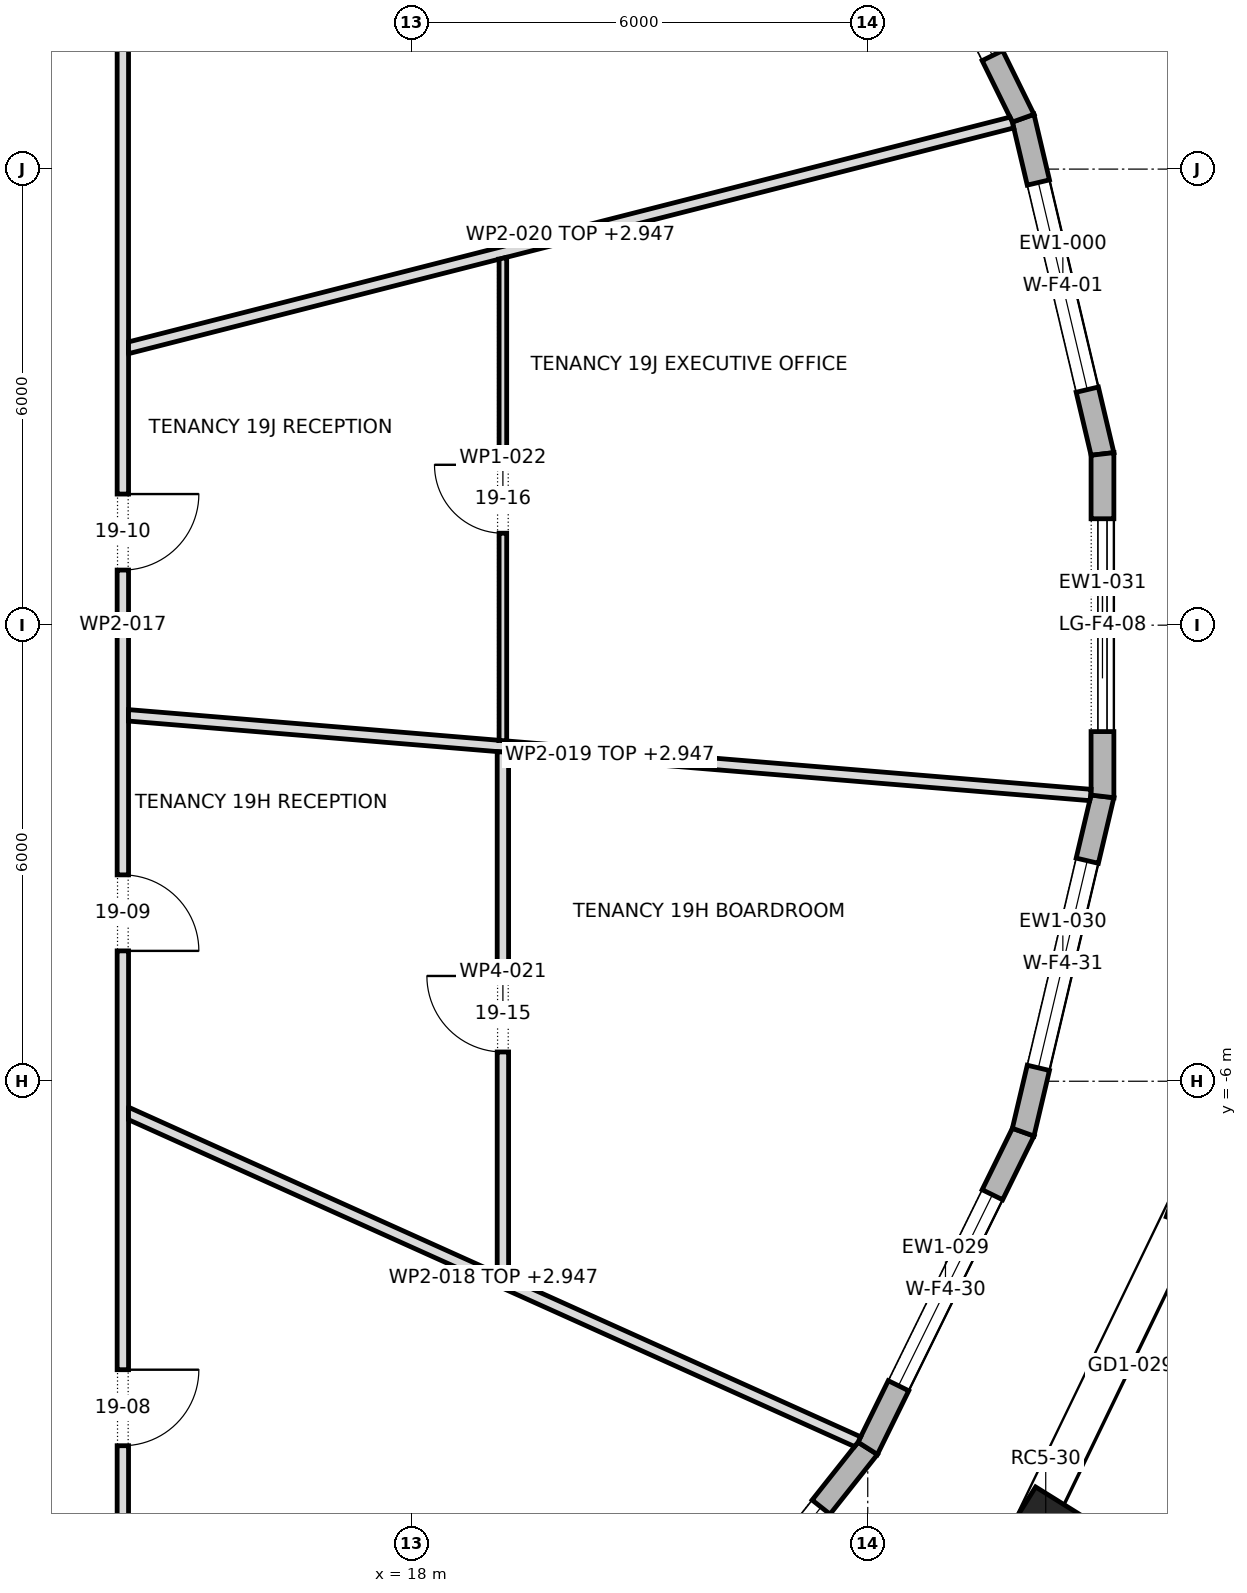
"""IFC4 building model, lengths in metres.
Left out: names, types, materials, properties, quantities, classifications, styles, units other than length and angle.
Written with IfcOpenShell. Run it as: python <this file> out.ifc"""

import sys

from ifc_helpers import new_model, si_unit, direction, frame, frame_2d, origin, origin_2d, place, context, subcontext, project, spatial, polyline, rectangle, outline, extrude, element, fill, save


model = new_model("IFC4")
c1 = context("Model", 3, precision=1e-05, world=origin(), true_north=direction((0.0, 1.0)))
c2 = subcontext(c1, "Body", "Model", "MODEL_VIEW")
j1 = project(units=[si_unit("LENGTHUNIT", "METRE"), si_unit("PLANEANGLEUNIT", "RADIAN")], contexts=[c1])
p1 = place(None, origin())
s1 = spatial("IfcSite", under=j1, at=p1, CompositionType="ELEMENT")
p2 = place(p1, origin())
s2 = spatial("IfcBuilding", under=s1, at=p2, CompositionType="ELEMENT")
p3 = place(p2, frame((0.0, 0.0, 268.3)))
s3 = spatial("IfcBuildingStorey", under=s2, at=p3, CompositionType="ELEMENT", Elevation=268.3)
for number, where, z_axis, x_axis in (
    (1, (28.582, 7.432, 0.0), (0.0, 0.0, 1.0), (-0.334, 0.943, 0.0)),
    (2, (26.342, -12.069, 0.0), (0.0, 0.0, 1.0), (0.529, 0.849, 0.0)),
    (3, (28.582, -7.432, 0.0), (0.0, 0.0, 1.0), (0.334, 0.943, 0.0)),
):
    element("IfcColumn", number, at=place(p3, frame(where, z_axis=z_axis, x_axis=x_axis)), inside=s3, PredefinedType="COLUMN", context=c2, shape_type="SweptSolid", body=[
        extrude(rectangle(XDim=1.1, YDim=1.0, at=origin_2d()), origin(), (0.0, 0.0, 1.0), 4.0),
    ])
p4 = place(p3, frame((27.088, 2.252, 0.0), z_axis=(0.0, 0.0, 1.0), x_axis=(-0.22983372436, 0.973229910734, 0.0)))
e4 = element("IfcWall", 4, at=p4, inside=s3, PredefinedType="STANDARD", context=c2, shape_type="SweptSolid", body=[
    extrude(outline(polyline([(-0.018, -0.15), (4.556, -0.15), (4.522, 0.15), (0.018, 0.15), (-0.018, -0.15)])), origin(), (0.0, 0.0, 1.0), 3.7),
])
p5 = place(p4, frame((0.869, 0.0, 0.6)))
e5 = element("IfcOpeningElement", 5, at=p5, cuts=e4, PredefinedType="OPENING", context=c2, shape_type="SweptSolid", body=[
    extrude(rectangle(XDim=2.8, YDim=2.65, at=frame_2d((1.4, 1.325))), frame((0.0, 0.162, 0.0), z_axis=(0.0, -1.0, 0.0), x_axis=(1.0, 0.0, 0.0)), (0.0, 0.0, 1.0), 0.324),
])
p6 = place(p3, frame((26.045, 6.67, 0.0), z_axis=(0.0, 0.0, 1.0), x_axis=(-0.441261940724, 0.897378348117, 0.0)))
e6 = element("IfcWall", 6, at=p6, inside=s3, PredefinedType="STANDARD", context=c2, shape_type="SweptSolid", body=[
    extrude(outline(polyline([(-0.017, -0.15), (4.651, -0.15), (4.619, 0.15), (0.017, 0.15), (-0.017, -0.15)])), origin(), (0.0, 0.0, 1.0), 3.7),
])
p7 = place(p6, frame((0.917, 0.0, 0.6)))
e7 = element("IfcOpeningElement", 7, at=p7, cuts=e6, PredefinedType="OPENING", context=c2, shape_type="SweptSolid", body=[
    extrude(rectangle(XDim=2.8, YDim=2.65, at=frame_2d((1.4, 1.325))), frame((0.0, 0.162, 0.0), z_axis=(0.0, -1.0, 0.0), x_axis=(1.0, 0.0, 0.0)), (0.0, 0.0, 1.0), 0.324),
])
p8 = place(p3, frame((21.032, -14.57, 0.0), z_axis=(0.0, 0.0, 1.0), x_axis=(0.621434755851, 0.783465917715, 0.0)))
e8 = element("IfcWall", 8, at=p8, inside=s3, PredefinedType="STANDARD", context=c2, shape_type="SweptSolid", body=[
    extrude(outline(polyline([(-0.015, -0.15), (4.791, -0.15), (4.759, 0.15), (0.015, 0.15), (-0.015, -0.15)])), origin(), (0.0, 0.0, 1.0), 3.7),
])
p9 = place(p8, frame((0.987, 0.0, 0.6)))
e9 = element("IfcOpeningElement", 9, at=p9, cuts=e8, PredefinedType="OPENING", context=c2, shape_type="SweptSolid", body=[
    extrude(rectangle(XDim=2.8, YDim=2.65, at=frame_2d((1.4, 1.325))), frame((0.0, 0.162, 0.0), z_axis=(0.0, -1.0, 0.0), x_axis=(1.0, 0.0, 0.0)), (0.0, 0.0, 1.0), 0.324),
])
p10 = place(p3, frame((24.0, -10.829, 0.0), z_axis=(0.0, 0.0, 1.0), x_axis=(0.441261940724, 0.897378348117, 0.0)))
e10 = element("IfcWall", 10, at=p10, inside=s3, PredefinedType="STANDARD", context=c2, shape_type="SweptSolid", body=[
    extrude(outline(polyline([(-0.016, -0.15), (4.652, -0.15), (4.618, 0.15), (0.016, 0.15), (-0.016, -0.15)])), origin(), (0.0, 0.0, 1.0), 3.7),
])
p11 = place(p10, frame((0.917, 0.0, 0.6)))
e11 = element("IfcOpeningElement", 11, at=p11, cuts=e10, PredefinedType="OPENING", context=c2, shape_type="SweptSolid", body=[
    extrude(rectangle(XDim=2.8, YDim=2.65, at=frame_2d((1.4, 1.325))), frame((0.0, 0.162, 0.0), z_axis=(0.0, -1.0, 0.0), x_axis=(1.0, 0.0, 0.0)), (0.0, 0.0, 1.0), 0.324),
])
p12 = place(p3, frame((26.045, -6.67, 0.0), z_axis=(0.0, 0.0, 1.0), x_axis=(0.22983372436, 0.973229910734, 0.0)))
e12 = element("IfcWall", 12, at=p12, inside=s3, PredefinedType="STANDARD", context=c2, shape_type="SweptSolid", body=[
    extrude(outline(polyline([(-0.017, -0.15), (4.557, -0.15), (4.521, 0.15), (0.017, 0.15), (-0.017, -0.15)])), origin(), (0.0, 0.0, 1.0), 3.7),
])
p13 = place(p12, frame((0.869, 0.0, 0.6)))
e13 = element("IfcOpeningElement", 13, at=p13, cuts=e12, PredefinedType="OPENING", context=c2, shape_type="SweptSolid", body=[
    extrude(rectangle(XDim=2.8, YDim=2.65, at=frame_2d((1.4, 1.325))), frame((0.0, 0.162, 0.0), z_axis=(0.0, -1.0, 0.0), x_axis=(1.0, 0.0, 0.0)), (0.0, 0.0, 1.0), 0.324),
])
p14 = place(p3, frame((27.088, -2.252, 0.0), z_axis=(0.0, 0.0, 1.0), x_axis=(0.0, 1.0, 0.0)))
e14 = element("IfcWall", 14, at=p14, inside=s3, PredefinedType="STANDARD", context=c2, shape_type="SweptSolid", body=[
    extrude(outline(polyline([(-0.018, -0.15), (4.522, -0.15), (4.487, 0.15), (0.018, 0.15), (-0.018, -0.15)])), origin(), (0.0, 0.0, 1.0), 3.7),
])
p15 = place(p14, frame((0.852, 0.0, 0.0)))
e15 = element("IfcOpeningElement", 15, at=p15, cuts=e14, PredefinedType="OPENING", context=c2, shape_type="SweptSolid", body=[
    extrude(rectangle(XDim=2.8, YDim=3.25, at=frame_2d((1.4, 1.625))), frame((0.0, 0.162, 0.0), z_axis=(0.0, -1.0, 0.0), x_axis=(1.0, 0.0, 0.0)), (0.0, 0.0, 1.0), 0.324),
])
p16 = place(p3, frame((14.2, -14.275, 0.0), z_axis=(0.0, 0.0, 1.0), x_axis=(0.0, 1.0, 0.0)))
e16 = element("IfcWall", 16, at=p16, inside=s3, PredefinedType="PARTITIONING", context=c2, shape_type="SweptSolid", body=[
    extrude(outline(polyline([(28.55, -0.075), (28.55, -0.075), (28.4, 0.075), (26.517, 0.075), (24.633, 0.075), (22.75, 0.075), (20.866, 0.075), (18.983, 0.075), (17.1, 0.075), (15.217, 0.075), (13.333, 0.075), (11.45, 0.075), (9.567, 0.075), (7.683, 0.075), (5.8, 0.075), (3.917, 0.075), (2.033, 0.075), (0.15, 0.075), (0.0, -0.075), (1.903, -0.075), (3.807, -0.075), (5.71, -0.075), (7.613, -0.075), (9.517, -0.075), (11.42, -0.075), (13.323, -0.075), (15.227, -0.075), (17.13, -0.075), (19.033, -0.075), (20.937, -0.075), (22.84, -0.075), (24.743, -0.075), (26.646, -0.075), (28.55, -0.075)])), origin(), (0.0, 0.0, 1.0), 3.7),
])
p17 = place(p16, frame((3.48, 0.0, 0.0)))
e17 = element("IfcOpeningElement", 17, at=p17, cuts=e16, PredefinedType="OPENING", context=c2, shape_type="SweptSolid", body=[
    extrude(rectangle(XDim=1.0, YDim=2.1, at=frame_2d((0.5, 1.05))), frame((0.0, 0.087, 0.0), z_axis=(0.0, -1.0, 0.0), x_axis=(1.0, 0.0, 0.0)), (0.0, 0.0, 1.0), 0.174),
])
p18 = place(p16, frame((9.99, 0.0, 0.0)))
e18 = element("IfcOpeningElement", 18, at=p18, cuts=e16, PredefinedType="OPENING", context=c2, shape_type="SweptSolid", body=[
    extrude(rectangle(XDim=1.0, YDim=2.1, at=frame_2d((0.5, 1.05))), frame((0.0, 0.087, 0.0), z_axis=(0.0, -1.0, 0.0), x_axis=(1.0, 0.0, 0.0)), (0.0, 0.0, 1.0), 0.174),
])
p19 = place(p16, frame((15.0, 0.0, 0.0)))
e19 = element("IfcOpeningElement", 19, at=p19, cuts=e16, PredefinedType="OPENING", context=c2, shape_type="SweptSolid", body=[
    extrude(rectangle(XDim=1.0, YDim=2.1, at=frame_2d((0.5, 1.05))), frame((0.0, 0.087, 0.0), z_axis=(0.0, -1.0, 0.0), x_axis=(1.0, 0.0, 0.0)), (0.0, 0.0, 1.0), 0.174),
])
p20 = place(p16, frame((22.69, 0.0, 0.0)))
e20 = element("IfcOpeningElement", 20, at=p20, cuts=e16, PredefinedType="OPENING", context=c2, shape_type="SweptSolid", body=[
    extrude(rectangle(XDim=1.0, YDim=2.1, at=frame_2d((0.5, 1.05))), frame((0.0, 0.087, 0.0), z_axis=(0.0, -1.0, 0.0), x_axis=(1.0, 0.0, 0.0)), (0.0, 0.0, 1.0), 0.174),
])
p21 = place(p3, frame((14.245, -6.41, 0.0), z_axis=(0.0, 0.0, 1.0), x_axis=(0.91183931518, -0.410547272908, 0.0)))
e21 = element("IfcWall", 21, at=p21, inside=s3, PredefinedType="PARTITIONING", context=c2, shape_type="SweptSolid", body=[
    extrude(outline(polyline([(0.067, -0.075), (1.813, -0.075), (3.559, -0.075), (5.304, -0.075), (7.05, -0.075), (8.796, -0.075), (10.542, -0.075), (10.56, -0.003), (10.562, 0.073), (10.562, 0.075), (8.816, 0.075), (7.07, 0.075), (5.324, 0.075), (5.319, 0.073), (5.318, 0.075), (3.546, 0.075), (1.773, 0.075), (0.0, 0.075), (0.0, 0.074), (0.067, -0.075)])), origin(), (0.0, 0.0, 1.0), 2.947),
])
p22 = place(p3, frame((14.269, -1.186, 0.0), z_axis=(0.0, 0.0, 1.0), x_axis=(0.996588692452, -0.082528650035, 0.0)))
e22 = element("IfcWall", 22, at=p22, inside=s3, PredefinedType="PARTITIONING", context=c2, shape_type="SweptSolid", body=[
    extrude(outline(polyline([(0.012, -0.075), (1.682, -0.075), (3.353, -0.075), (5.023, -0.075), (5.029, -0.074), (5.029, -0.075), (6.947, -0.075), (8.865, -0.075), (10.783, -0.075), (12.701, -0.075), (12.706, -0.042), (12.706, 0.075), (10.753, 0.075), (8.8, 0.075), (6.847, 0.075), (4.894, 0.075), (4.891, 0.075), (4.891, 0.075), (3.261, 0.075), (1.63, 0.075), (0.0, 0.075), (0.0, 0.069), (0.012, -0.075)])), origin(), (0.0, 0.0, 1.0), 2.947),
])
p23 = place(p3, frame((14.257, 3.645, 0.0), z_axis=(0.0, 0.0, 1.0), x_axis=(0.968990601513, 0.247097580277, 0.0)))
e23 = element("IfcWall", 23, at=p23, inside=s3, PredefinedType="PARTITIONING", context=c2, shape_type="SweptSolid", body=[
    extrude(outline(polyline([(12.019, -0.075), (12.019, 0.011), (12.005, 0.075), (10.011, 0.075), (8.016, 0.075), (6.022, 0.075), (4.027, 0.075), (2.033, 0.075), (0.038, 0.075), (0.0, -0.074), (0.0, -0.075), (1.717, -0.075), (3.434, -0.075), (5.151, -0.075), (6.868, -0.075), (8.585, -0.075), (10.302, -0.075), (12.019, -0.075)])), origin(), (0.0, 0.0, 1.0), 2.947),
])
p24 = place(p3, frame((19.2, -1.664, 0.0), z_axis=(0.0, 0.0, 1.0), x_axis=(0.0, -1.0, 0.0)))
e24 = element("IfcWall", 24, at=p24, inside=s3, PredefinedType="PARTITIONING", context=c2, shape_type="SweptSolid", body=[
    extrude(outline(polyline([(0.0, -0.075), (1.715, -0.075), (3.431, -0.075), (5.146, -0.075), (6.862, -0.075), (6.929, 0.074), (6.929, 0.075), (5.2, 0.075), (3.47, 0.075), (1.741, 0.075), (0.012, 0.075), (0.0, -0.07), (0.0, -0.075)])), origin(), (0.0, 0.0, 1.0), 3.7),
])
p25 = place(p24, frame((2.951, 0.0, 0.0)))
e25 = element("IfcOpeningElement", 25, at=p25, cuts=e24, PredefinedType="OPENING", context=c2, shape_type="SweptSolid", body=[
    extrude(rectangle(XDim=1.0, YDim=2.1, at=frame_2d((0.5, 1.05))), frame((0.0, 0.087, 0.0), z_axis=(0.0, -1.0, 0.0), x_axis=(1.0, 0.0, 0.0)), (0.0, 0.0, 1.0), 0.174),
])
p26 = place(p3, frame((19.2, 4.84, 0.0), z_axis=(0.0, 0.0, 1.0), x_axis=(0.0, -1.0, 0.0)))
e26 = element("IfcWall", 26, at=p26, inside=s3, PredefinedType="PARTITIONING", context=c2, shape_type="SweptSolid", body=[
    extrude(outline(polyline([(0.025, -0.05), (1.607, -0.05), (3.19, -0.05), (4.772, -0.05), (6.355, -0.05), (6.363, 0.045), (6.363, 0.05), (4.772, 0.05), (3.181, 0.05), (1.591, 0.05), (0.0, 0.05), (0.0, 0.049), (0.025, -0.05)])), origin(), (0.0, 0.0, 1.0), 3.7),
])
p27 = place(p26, frame((2.73, 0.0, 0.0)))
e27 = element("IfcOpeningElement", 27, at=p27, cuts=e26, PredefinedType="OPENING", context=c2, shape_type="SweptSolid", body=[
    extrude(rectangle(XDim=0.9, YDim=2.1, at=frame_2d((0.45, 1.05))), frame((0.0, 0.062, 0.0), z_axis=(0.0, -1.0, 0.0), x_axis=(1.0, 0.0, 0.0)), (0.0, 0.0, 1.0), 0.124),
])
p28 = place(p5, origin())
e28 = element("IfcWindow", 28, at=p28, inside=s3, PartitioningType="DOUBLE_PANEL_VERTICAL", PredefinedType="WINDOW", context=c2, shape_type="SweptSolid", body=[
    extrude(rectangle(XDim=2.8, YDim=2.65, at=frame_2d((1.4, 1.325))), frame((0.0, 0.03, 0.0), z_axis=(0.0, -1.0, 0.0), x_axis=(1.0, 0.0, 0.0)), (0.0, 0.0, 1.0), 0.06),
])
fill(e5, e28)
p29 = place(p7, origin())
e29 = element("IfcWindow", 29, at=p29, inside=s3, PartitioningType="DOUBLE_PANEL_VERTICAL", PredefinedType="WINDOW", context=c2, shape_type="SweptSolid", body=[
    extrude(rectangle(XDim=2.8, YDim=2.65, at=frame_2d((1.4, 1.325))), frame((0.0, 0.03, 0.0), z_axis=(0.0, -1.0, 0.0), x_axis=(1.0, 0.0, 0.0)), (0.0, 0.0, 1.0), 0.06),
])
fill(e7, e29)
p30 = place(p9, origin())
e30 = element("IfcWindow", 30, at=p30, inside=s3, PartitioningType="DOUBLE_PANEL_VERTICAL", PredefinedType="WINDOW", context=c2, shape_type="SweptSolid", body=[
    extrude(rectangle(XDim=2.8, YDim=2.65, at=frame_2d((1.4, 1.325))), frame((0.0, 0.03, 0.0), z_axis=(0.0, -1.0, 0.0), x_axis=(1.0, 0.0, 0.0)), (0.0, 0.0, 1.0), 0.06),
])
fill(e9, e30)
p31 = place(p11, origin())
e31 = element("IfcWindow", 31, at=p31, inside=s3, PartitioningType="DOUBLE_PANEL_VERTICAL", PredefinedType="WINDOW", context=c2, shape_type="SweptSolid", body=[
    extrude(rectangle(XDim=2.8, YDim=2.65, at=frame_2d((1.4, 1.325))), frame((0.0, 0.03, 0.0), z_axis=(0.0, -1.0, 0.0), x_axis=(1.0, 0.0, 0.0)), (0.0, 0.0, 1.0), 0.06),
])
fill(e11, e31)
p32 = place(p13, origin())
e32 = element("IfcWindow", 32, at=p32, inside=s3, PartitioningType="DOUBLE_PANEL_VERTICAL", PredefinedType="WINDOW", context=c2, shape_type="SweptSolid", body=[
    extrude(rectangle(XDim=2.8, YDim=2.65, at=frame_2d((1.4, 1.325))), frame((0.0, 0.03, 0.0), z_axis=(0.0, -1.0, 0.0), x_axis=(1.0, 0.0, 0.0)), (0.0, 0.0, 1.0), 0.06),
])
fill(e13, e32)
p33 = place(p15, origin())
e33 = element("IfcDoor", 33, at=p33, inside=s3, OperationType="DOUBLE_DOOR_SLIDING", PredefinedType="DOOR", context=c2, shape_type="SweptSolid", body=[
    extrude(rectangle(XDim=2.8, YDim=3.25, at=frame_2d((1.4, 1.625))), frame((0.0, 0.025, 0.0), z_axis=(0.0, -1.0, 0.0), x_axis=(1.0, 0.0, 0.0)), (0.0, 0.0, 1.0), 0.05),
])
fill(e15, e33)
p34 = place(p17, frame((1.0, 0.0, 0.0), z_axis=(0.0, 0.0, 1.0), x_axis=(-1.0, 0.0, 0.0)))
e34 = element("IfcDoor", 34, at=p34, inside=s3, OperationType="SINGLE_SWING_RIGHT", PredefinedType="DOOR", context=c2, shape_type="SweptSolid", body=[
    extrude(rectangle(XDim=1.0, YDim=2.1, at=frame_2d((0.5, 1.05))), frame((0.0, 0.025, 0.0), z_axis=(0.0, -1.0, 0.0), x_axis=(1.0, 0.0, 0.0)), (0.0, 0.0, 1.0), 0.05),
])
fill(e17, e34)
p35 = place(p18, frame((1.0, 0.0, 0.0), z_axis=(0.0, 0.0, 1.0), x_axis=(-1.0, 0.0, 0.0)))
e35 = element("IfcDoor", 35, at=p35, inside=s3, OperationType="SINGLE_SWING_LEFT", PredefinedType="DOOR", context=c2, shape_type="SweptSolid", body=[
    extrude(rectangle(XDim=1.0, YDim=2.1, at=frame_2d((0.5, 1.05))), frame((0.0, 0.025, 0.0), z_axis=(0.0, -1.0, 0.0), x_axis=(1.0, 0.0, 0.0)), (0.0, 0.0, 1.0), 0.05),
])
fill(e18, e35)
p36 = place(p19, frame((1.0, 0.0, 0.0), z_axis=(0.0, 0.0, 1.0), x_axis=(-1.0, 0.0, 0.0)))
e36 = element("IfcDoor", 36, at=p36, inside=s3, OperationType="SINGLE_SWING_RIGHT", PredefinedType="DOOR", context=c2, shape_type="SweptSolid", body=[
    extrude(rectangle(XDim=1.0, YDim=2.1, at=frame_2d((0.5, 1.05))), frame((0.0, 0.025, 0.0), z_axis=(0.0, -1.0, 0.0), x_axis=(1.0, 0.0, 0.0)), (0.0, 0.0, 1.0), 0.05),
])
fill(e19, e36)
p37 = place(p25, frame((1.0, 0.0, 0.0), z_axis=(0.0, 0.0, 1.0), x_axis=(-1.0, 0.0, 0.0)))
e37 = element("IfcDoor", 37, at=p37, inside=s3, OperationType="SINGLE_SWING_LEFT", PredefinedType="DOOR", context=c2, shape_type="SweptSolid", body=[
    extrude(rectangle(XDim=1.0, YDim=2.1, at=frame_2d((0.5, 1.05))), frame((0.0, 0.025, 0.0), z_axis=(0.0, -1.0, 0.0), x_axis=(1.0, 0.0, 0.0)), (0.0, 0.0, 1.0), 0.05),
])
fill(e25, e37)
p38 = place(p27, frame((0.9, 0.0, 0.0), z_axis=(0.0, 0.0, 1.0), x_axis=(-1.0, 0.0, 0.0)))
e38 = element("IfcDoor", 38, at=p38, inside=s3, OperationType="SINGLE_SWING_LEFT", PredefinedType="DOOR", context=c2, shape_type="SweptSolid", body=[
    extrude(rectangle(XDim=0.9, YDim=2.1, at=frame_2d((0.45, 1.05))), frame((0.0, 0.025, 0.0), z_axis=(0.0, -1.0, 0.0), x_axis=(1.0, 0.0, 0.0)), (0.0, 0.0, 1.0), 0.05),
])
fill(e27, e38)
save(model, sys.argv[1])
